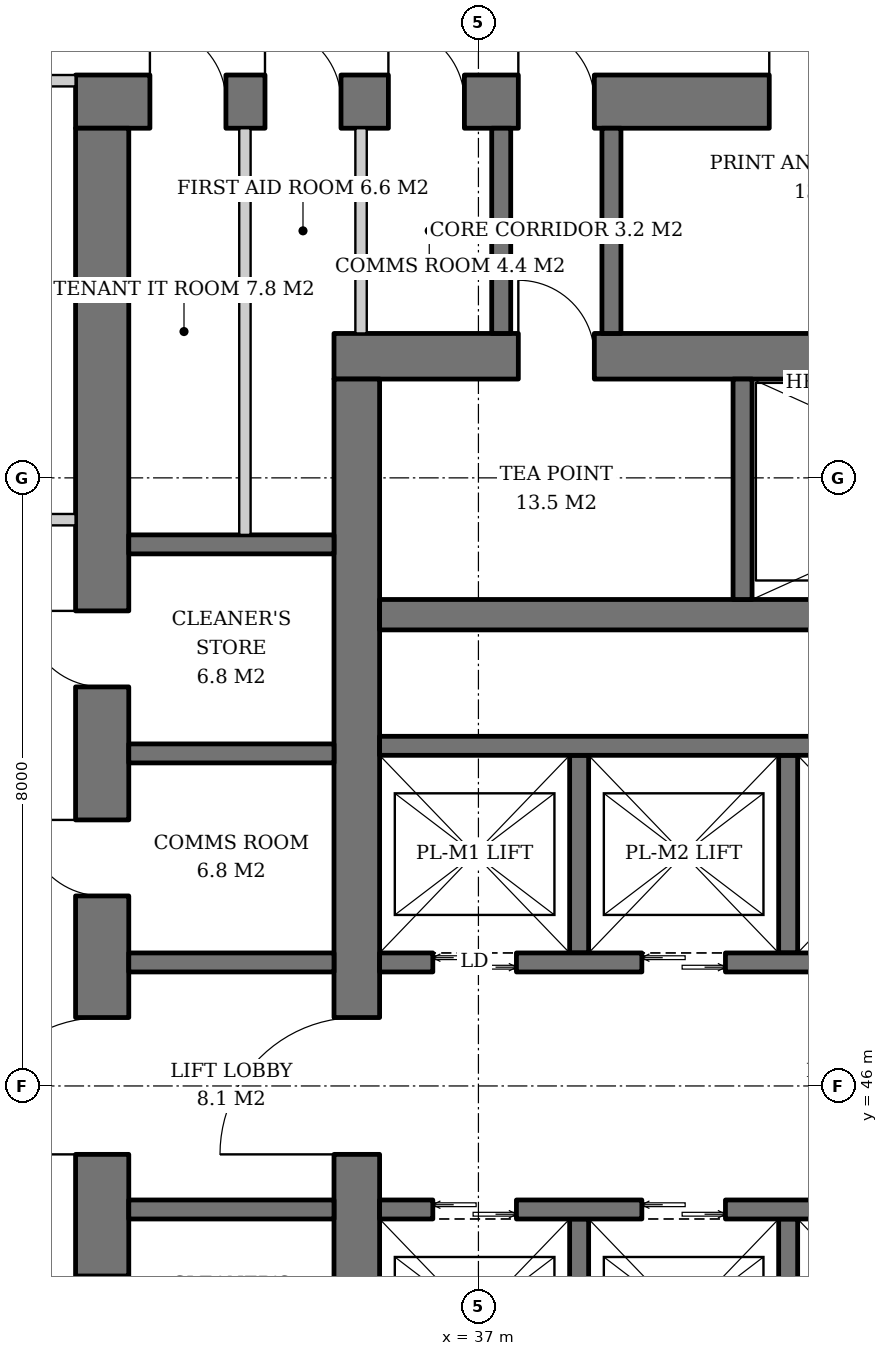
"""IFC4 building model, lengths in metres.
Left out: names, types, materials, properties, quantities, classifications, styles, units other than length and angle.
Written with IfcOpenShell. Run it as: python <this file> out.ifc"""

import sys

from ifc_helpers import new_model, si_unit, direction, frame, frame_2d, origin, place, context, subcontext, project, spatial, rectangle, extrude, element, fill, save


model = new_model("IFC4")
c1 = context("Model", 3, precision=1e-05, world=origin(), true_north=direction((0.0, 1.0)))
c2 = subcontext(c1, "Body", "Model", "MODEL_VIEW")
j1 = project(units=[si_unit("LENGTHUNIT", "METRE"), si_unit("PLANEANGLEUNIT", "RADIAN")], contexts=[c1])
p1 = place(None, origin())
s1 = spatial("IfcSite", under=j1, at=p1, CompositionType="ELEMENT")
p2 = place(p1, origin())
s2 = spatial("IfcBuilding", under=s1, at=p2, CompositionType="ELEMENT")
p3 = place(p2, frame((0.0, 0.0, 119.8)))
s3 = spatial("IfcBuildingStorey", under=s2, at=p3, CompositionType="ELEMENT", Elevation=119.8)
p4 = place(p3, frame((35.1, 55.6, 0.0), z_axis=(0.0, 0.0, 1.0), x_axis=(1.0, 0.0, 0.0)))
e1 = element("IfcWall", 1, at=p4, inside=s3, PredefinedType="SHEAR", context=c2, shape_type="SweptSolid", body=[
    extrude(rectangle(XDim=19.8, YDim=0.6, at=frame_2d((9.9, 0.0))), origin(), (0.0, 0.0, 1.0), 3.8),
])
p5 = place(p4, frame((14.54, 0.0, 0.0)))
e2 = element("IfcOpeningElement", 2, at=p5, cuts=e1, PredefinedType="OPENING", context=c2, shape_type="SweptSolid", body=[
    extrude(rectangle(XDim=1.0, YDim=2.1, at=frame_2d((0.5, 1.05))), frame((0.0, 0.31, 0.0), z_axis=(0.0, -1.0, 0.0), x_axis=(1.0, 0.0, 0.0)), (0.0, 0.0, 1.0), 0.62),
])
p6 = place(p4, frame((2.425, 0.0, 0.0)))
e3 = element("IfcOpeningElement", 3, at=p6, cuts=e1, PredefinedType="OPENING", context=c2, shape_type="SweptSolid", body=[
    extrude(rectangle(XDim=1.0, YDim=2.1, at=frame_2d((0.5, 1.05))), frame((0.0, 0.31, 0.0), z_axis=(0.0, -1.0, 0.0), x_axis=(1.0, 0.0, 0.0)), (0.0, 0.0, 1.0), 0.62),
])
p7 = place(p3, frame((35.4, 36.7, 0.0), z_axis=(0.0, 0.0, 1.0), x_axis=(0.0, 1.0, 0.0)))
e4 = element("IfcWall", 4, at=p7, inside=s3, PredefinedType="SHEAR", context=c2, shape_type="SweptSolid", body=[
    extrude(rectangle(XDim=18.6, YDim=0.6, at=frame_2d((9.3, 0.0))), origin(), (0.0, 0.0, 1.0), 3.8),
])
p8 = place(p7, frame((8.4, 0.0, 0.0)))
e5 = element("IfcOpeningElement", 5, at=p8, cuts=e4, PredefinedType="OPENING", context=c2, shape_type="SweptSolid", body=[
    extrude(rectangle(XDim=1.8, YDim=2.4, at=frame_2d((0.9, 1.2))), frame((0.0, 0.31, 0.0), z_axis=(0.0, -1.0, 0.0), x_axis=(1.0, 0.0, 0.0)), (0.0, 0.0, 1.0), 0.62),
])
p9 = place(p3, frame((31.7, 58.95, 0.0), z_axis=(0.0, 0.0, 1.0), x_axis=(1.0, 0.0, 0.0)))
e6 = element("IfcWall", 6, at=p9, inside=s3, PredefinedType="SHEAR", context=c2, shape_type="SweptSolid", body=[
    extrude(rectangle(XDim=26.6, YDim=0.7, at=frame_2d((13.3, 0.0))), origin(), (0.0, 0.0, 1.0), 3.8),
])
p10 = place(p9, frame((17.94, 0.0, 0.0)))
e7 = element("IfcOpeningElement", 7, at=p10, cuts=e6, PredefinedType="OPENING", context=c2, shape_type="SweptSolid", body=[
    extrude(rectangle(XDim=1.0, YDim=2.1, at=frame_2d((0.5, 1.05))), frame((0.0, 0.36, 0.0), z_axis=(0.0, -1.0, 0.0), x_axis=(1.0, 0.0, 0.0)), (0.0, 0.0, 1.0), 0.72),
])
p11 = place(p9, frame((5.825, 0.0, 0.0)))
e8 = element("IfcOpeningElement", 8, at=p11, cuts=e6, PredefinedType="OPENING", context=c2, shape_type="SweptSolid", body=[
    extrude(rectangle(XDim=1.0, YDim=2.1, at=frame_2d((0.5, 1.05))), frame((0.0, 0.36, 0.0), z_axis=(0.0, -1.0, 0.0), x_axis=(1.0, 0.0, 0.0)), (0.0, 0.0, 1.0), 0.72),
])
p12 = place(p9, frame((0.978, 0.0, 0.0)))
e9 = element("IfcOpeningElement", 9, at=p12, cuts=e6, PredefinedType="OPENING", context=c2, shape_type="SweptSolid", body=[
    extrude(rectangle(XDim=1.0, YDim=2.1, at=frame_2d((0.5, 1.05))), frame((0.0, 0.36, 0.0), z_axis=(0.0, -1.0, 0.0), x_axis=(1.0, 0.0, 0.0)), (0.0, 0.0, 1.0), 0.72),
])
p13 = place(p9, frame((2.492, 0.0, 0.0)))
e10 = element("IfcOpeningElement", 10, at=p13, cuts=e6, PredefinedType="OPENING", context=c2, shape_type="SweptSolid", body=[
    extrude(rectangle(XDim=1.0, YDim=2.1, at=frame_2d((0.5, 1.05))), frame((0.0, 0.36, 0.0), z_axis=(0.0, -1.0, 0.0), x_axis=(1.0, 0.0, 0.0)), (0.0, 0.0, 1.0), 0.72),
])
p14 = place(p9, frame((4.115, 0.0, 0.0)))
e11 = element("IfcOpeningElement", 11, at=p14, cuts=e6, PredefinedType="OPENING", context=c2, shape_type="SweptSolid", body=[
    extrude(rectangle(XDim=1.0, YDim=2.1, at=frame_2d((0.5, 1.05))), frame((0.0, 0.36, 0.0), z_axis=(0.0, -1.0, 0.0), x_axis=(1.0, 0.0, 0.0)), (0.0, 0.0, 1.0), 0.72),
])
p15 = place(p9, frame((9.126, 0.0, 0.0)))
e12 = element("IfcOpeningElement", 12, at=p15, cuts=e6, PredefinedType="OPENING", context=c2, shape_type="SweptSolid", body=[
    extrude(rectangle(XDim=1.0, YDim=2.1, at=frame_2d((0.5, 1.05))), frame((0.0, 0.36, 0.0), z_axis=(0.0, -1.0, 0.0), x_axis=(1.0, 0.0, 0.0)), (0.0, 0.0, 1.0), 0.72),
])
p16 = place(p9, frame((14.029, 0.0, 0.0)))
e13 = element("IfcOpeningElement", 13, at=p16, cuts=e6, PredefinedType="OPENING", context=c2, shape_type="SweptSolid", body=[
    extrude(rectangle(XDim=1.0, YDim=2.1, at=frame_2d((0.5, 1.05))), frame((0.0, 0.36, 0.0), z_axis=(0.0, -1.0, 0.0), x_axis=(1.0, 0.0, 0.0)), (0.0, 0.0, 1.0), 0.72),
])
p17 = place(p9, frame((22.4, 0.0, 0.0)))
e14 = element("IfcOpeningElement", 14, at=p17, cuts=e6, PredefinedType="OPENING", context=c2, shape_type="SweptSolid", body=[
    extrude(rectangle(XDim=1.0, YDim=2.1, at=frame_2d((0.5, 1.05))), frame((0.0, 0.36, 0.0), z_axis=(0.0, -1.0, 0.0), x_axis=(1.0, 0.0, 0.0)), (0.0, 0.0, 1.0), 0.72),
])
p18 = place(p3, frame((32.05, 33.4, 0.0), z_axis=(0.0, 0.0, 1.0), x_axis=(0.0, 1.0, 0.0)))
e15 = element("IfcWall", 15, at=p18, inside=s3, PredefinedType="SHEAR", context=c2, shape_type="SweptSolid", body=[
    extrude(rectangle(XDim=25.2, YDim=0.7, at=frame_2d((12.6, 0.0))), origin(), (0.0, 0.0, 1.0), 3.8),
])
p19 = place(p18, frame((11.7, 0.0, 0.0)))
e16 = element("IfcOpeningElement", 16, at=p19, cuts=e15, PredefinedType="OPENING", context=c2, shape_type="SweptSolid", body=[
    extrude(rectangle(XDim=1.8, YDim=2.4, at=frame_2d((0.9, 1.2))), frame((0.0, 0.36, 0.0), z_axis=(0.0, -1.0, 0.0), x_axis=(1.0, 0.0, 0.0)), (0.0, 0.0, 1.0), 0.72),
])
p20 = place(p18, frame((3.6, 0.0, 0.0)))
e17 = element("IfcOpeningElement", 17, at=p20, cuts=e15, PredefinedType="OPENING", context=c2, shape_type="SweptSolid", body=[
    extrude(rectangle(XDim=1.0, YDim=2.1, at=frame_2d((0.5, 1.05))), frame((0.0, 0.36, 0.0), z_axis=(0.0, -1.0, 0.0), x_axis=(1.0, 0.0, 0.0)), (0.0, 0.0, 1.0), 0.72),
])
p21 = place(p18, frame((6.35, 0.0, 0.0)))
e18 = element("IfcOpeningElement", 18, at=p21, cuts=e15, PredefinedType="OPENING", context=c2, shape_type="SweptSolid", body=[
    extrude(rectangle(XDim=1.0, YDim=2.1, at=frame_2d((0.5, 1.05))), frame((0.0, 0.36, 0.0), z_axis=(0.0, -1.0, 0.0), x_axis=(1.0, 0.0, 0.0)), (0.0, 0.0, 1.0), 0.72),
])
p22 = place(p18, frame((9.1, 0.0, 0.0)))
e19 = element("IfcOpeningElement", 19, at=p22, cuts=e15, PredefinedType="OPENING", context=c2, shape_type="SweptSolid", body=[
    extrude(rectangle(XDim=1.0, YDim=2.1, at=frame_2d((0.5, 1.05))), frame((0.0, 0.36, 0.0), z_axis=(0.0, -1.0, 0.0), x_axis=(1.0, 0.0, 0.0)), (0.0, 0.0, 1.0), 0.72),
])
p23 = place(p18, frame((15.1, 0.0, 0.0)))
e20 = element("IfcOpeningElement", 20, at=p23, cuts=e15, PredefinedType="OPENING", context=c2, shape_type="SweptSolid", body=[
    extrude(rectangle(XDim=1.0, YDim=2.1, at=frame_2d((0.5, 1.05))), frame((0.0, 0.36, 0.0), z_axis=(0.0, -1.0, 0.0), x_axis=(1.0, 0.0, 0.0)), (0.0, 0.0, 1.0), 0.72),
])
p24 = place(p18, frame((17.85, 0.0, 0.0)))
e21 = element("IfcOpeningElement", 21, at=p24, cuts=e15, PredefinedType="OPENING", context=c2, shape_type="SweptSolid", body=[
    extrude(rectangle(XDim=1.0, YDim=2.1, at=frame_2d((0.5, 1.05))), frame((0.0, 0.36, 0.0), z_axis=(0.0, -1.0, 0.0), x_axis=(1.0, 0.0, 0.0)), (0.0, 0.0, 1.0), 0.72),
])
p25 = place(p3, frame((35.7, 52.2, 0.0), z_axis=(0.0, 0.0, 1.0), x_axis=(1.0, 0.0, 0.0)))
e22 = element("IfcWall", 22, at=p25, inside=s3, PredefinedType="SHEAR", context=c2, shape_type="SweptSolid", body=[
    extrude(rectangle(XDim=18.6, YDim=0.4, at=frame_2d((9.3, 0.0))), origin(), (0.0, 0.0, 1.0), 3.8),
])
p26 = place(p3, frame((40.475, 52.4, 0.0), z_axis=(0.0, 0.0, 1.0), x_axis=(0.0, 1.0, 0.0)))
e23 = element("IfcWall", 23, at=p26, inside=s3, PredefinedType="SHEAR", context=c2, shape_type="SweptSolid", body=[
    extrude(rectangle(XDim=2.9, YDim=0.25, at=frame_2d((1.45, 0.0))), origin(), (0.0, 0.0, 1.0), 3.8),
])
for number, where, z_axis, x_axis in (
    (24, (38.325, 47.75, 0.0), (0.0, 0.0, 1.0), (0.0, 1.0, 0.0)),
    (25, (41.075, 47.75, 0.0), (0.0, 0.0, 1.0), (0.0, 1.0, 0.0)),
):
    element("IfcWall", number, at=place(p3, frame(where, z_axis=z_axis, x_axis=x_axis)), inside=s3, PredefinedType="SHEAR", context=c2, shape_type="SweptSolid", body=[
        extrude(rectangle(XDim=2.6, YDim=0.25, at=frame_2d((1.3, 0.0))), origin(), (0.0, 0.0, 1.0), 3.8),
    ])
p27 = place(p3, frame((35.7, 50.475, 0.0), z_axis=(0.0, 0.0, 1.0), x_axis=(1.0, 0.0, 0.0)))
e26 = element("IfcWall", 26, at=p27, inside=s3, PredefinedType="SHEAR", context=c2, shape_type="SweptSolid", body=[
    extrude(rectangle(XDim=11.0, YDim=0.25, at=frame_2d((5.5, 0.0))), origin(), (0.0, 0.0, 1.0), 3.8),
])
p28 = place(p3, frame((35.7, 47.625, 0.0), z_axis=(0.0, 0.0, 1.0), x_axis=(1.0, 0.0, 0.0)))
e27 = element("IfcWall", 27, at=p28, inside=s3, PredefinedType="SHEAR", context=c2, shape_type="SweptSolid", body=[
    extrude(rectangle(XDim=12.83, YDim=0.25, at=frame_2d((6.415, 0.0))), origin(), (0.0, 0.0, 1.0), 3.8),
])
p29 = place(p28, frame((0.7, 0.0, 0.0)))
e28 = element("IfcOpeningElement", 28, at=p29, cuts=e27, PredefinedType="OPENING", context=c2, shape_type="SweptSolid", body=[
    extrude(rectangle(XDim=1.1, YDim=2.2, at=frame_2d((0.55, 1.1))), frame((0.0, 0.135, 0.0), z_axis=(0.0, -1.0, 0.0), x_axis=(1.0, 0.0, 0.0)), (0.0, 0.0, 1.0), 0.27),
])
p30 = place(p28, frame((3.45, 0.0, 0.0)))
e29 = element("IfcOpeningElement", 29, at=p30, cuts=e27, PredefinedType="OPENING", context=c2, shape_type="SweptSolid", body=[
    extrude(rectangle(XDim=1.1, YDim=2.2, at=frame_2d((0.55, 1.1))), frame((0.0, 0.135, 0.0), z_axis=(0.0, -1.0, 0.0), x_axis=(1.0, 0.0, 0.0)), (0.0, 0.0, 1.0), 0.27),
])
p31 = place(p28, frame((6.2, 0.0, 0.0)))
e30 = element("IfcOpeningElement", 30, at=p31, cuts=e27, PredefinedType="OPENING", context=c2, shape_type="SweptSolid", body=[
    extrude(rectangle(XDim=1.1, YDim=2.2, at=frame_2d((0.55, 1.1))), frame((0.0, 0.135, 0.0), z_axis=(0.0, -1.0, 0.0), x_axis=(1.0, 0.0, 0.0)), (0.0, 0.0, 1.0), 0.27),
])
p32 = place(p28, frame((8.95, 0.0, 0.0)))
e31 = element("IfcOpeningElement", 31, at=p32, cuts=e27, PredefinedType="OPENING", context=c2, shape_type="SweptSolid", body=[
    extrude(rectangle(XDim=1.1, YDim=2.2, at=frame_2d((0.55, 1.1))), frame((0.0, 0.135, 0.0), z_axis=(0.0, -1.0, 0.0), x_axis=(1.0, 0.0, 0.0)), (0.0, 0.0, 1.0), 0.27),
])
p33 = place(p28, frame((11.515, 0.0, 0.0)))
e32 = element("IfcOpeningElement", 32, at=p33, cuts=e27, PredefinedType="OPENING", context=c2, shape_type="SweptSolid", body=[
    extrude(rectangle(XDim=0.8, YDim=2.0, at=frame_2d((0.4, 1.0))), frame((0.0, 0.135, 0.0), z_axis=(0.0, -1.0, 0.0), x_axis=(1.0, 0.0, 0.0)), (0.0, 0.0, 1.0), 0.27),
])
for number, where, z_axis, x_axis in (
    (33, (38.325, 44.25, 0.0), (0.0, 0.0, 1.0), (0.0, -1.0, 0.0)),
    (34, (41.075, 44.25, 0.0), (0.0, 0.0, 1.0), (0.0, -1.0, 0.0)),
):
    element("IfcWall", number, at=place(p3, frame(where, z_axis=z_axis, x_axis=x_axis)), inside=s3, PredefinedType="SHEAR", context=c2, shape_type="SweptSolid", body=[
        extrude(rectangle(XDim=2.6, YDim=0.25, at=frame_2d((1.3, 0.0))), origin(), (0.0, 0.0, 1.0), 3.8),
    ])
p34 = place(p3, frame((35.7, 44.375, 0.0), z_axis=(0.0, 0.0, 1.0), x_axis=(1.0, 0.0, 0.0)))
e35 = element("IfcWall", 35, at=p34, inside=s3, PredefinedType="SHEAR", context=c2, shape_type="SweptSolid", body=[
    extrude(rectangle(XDim=12.83, YDim=0.25, at=frame_2d((6.415, 0.0))), origin(), (0.0, 0.0, 1.0), 3.8),
])
p35 = place(p34, frame((0.7, 0.0, 0.0)))
e36 = element("IfcOpeningElement", 36, at=p35, cuts=e35, PredefinedType="OPENING", context=c2, shape_type="SweptSolid", body=[
    extrude(rectangle(XDim=1.1, YDim=2.2, at=frame_2d((0.55, 1.1))), frame((0.0, 0.135, 0.0), z_axis=(0.0, -1.0, 0.0), x_axis=(1.0, 0.0, 0.0)), (0.0, 0.0, 1.0), 0.27),
])
p36 = place(p34, frame((3.45, 0.0, 0.0)))
e37 = element("IfcOpeningElement", 37, at=p36, cuts=e35, PredefinedType="OPENING", context=c2, shape_type="SweptSolid", body=[
    extrude(rectangle(XDim=1.1, YDim=2.2, at=frame_2d((0.55, 1.1))), frame((0.0, 0.135, 0.0), z_axis=(0.0, -1.0, 0.0), x_axis=(1.0, 0.0, 0.0)), (0.0, 0.0, 1.0), 0.27),
])
p37 = place(p34, frame((6.2, 0.0, 0.0)))
e38 = element("IfcOpeningElement", 38, at=p37, cuts=e35, PredefinedType="OPENING", context=c2, shape_type="SweptSolid", body=[
    extrude(rectangle(XDim=1.1, YDim=2.2, at=frame_2d((0.55, 1.1))), frame((0.0, 0.135, 0.0), z_axis=(0.0, -1.0, 0.0), x_axis=(1.0, 0.0, 0.0)), (0.0, 0.0, 1.0), 0.27),
])
p38 = place(p34, frame((8.95, 0.0, 0.0)))
e39 = element("IfcOpeningElement", 39, at=p38, cuts=e35, PredefinedType="OPENING", context=c2, shape_type="SweptSolid", body=[
    extrude(rectangle(XDim=1.1, YDim=2.2, at=frame_2d((0.55, 1.1))), frame((0.0, 0.135, 0.0), z_axis=(0.0, -1.0, 0.0), x_axis=(1.0, 0.0, 0.0)), (0.0, 0.0, 1.0), 0.27),
])
p39 = place(p34, frame((11.515, 0.0, 0.0)))
e40 = element("IfcOpeningElement", 40, at=p39, cuts=e35, PredefinedType="OPENING", context=c2, shape_type="SweptSolid", body=[
    extrude(rectangle(XDim=0.8, YDim=2.0, at=frame_2d((0.4, 1.0))), frame((0.0, 0.135, 0.0), z_axis=(0.0, -1.0, 0.0), x_axis=(1.0, 0.0, 0.0)), (0.0, 0.0, 1.0), 0.27),
])
for number, where, z_axis, x_axis in (
    (41, (32.4, 44.375, 0.0), (0.0, 0.0, 1.0), (1.0, 0.0, 0.0)),
    (42, (32.4, 47.625, 0.0), (0.0, 0.0, 1.0), (1.0, 0.0, 0.0)),
    (43, (32.4, 50.375, 0.0), (0.0, 0.0, 1.0), (1.0, 0.0, 0.0)),
    (44, (32.4, 53.125, 0.0), (0.0, 0.0, 1.0), (1.0, 0.0, 0.0)),
):
    element("IfcWall", number, at=place(p3, frame(where, z_axis=z_axis, x_axis=x_axis)), inside=s3, PredefinedType="SHEAR", context=c2, shape_type="SweptSolid", body=[
        extrude(rectangle(XDim=2.7, YDim=0.25, at=frame_2d((1.35, 0.0))), origin(), (0.0, 0.0, 1.0), 3.8),
    ])
for number, where, z_axis, x_axis in (
    (45, (37.3, 55.9, 0.0), (0.0, 0.0, 1.0), (0.0, 1.0, 0.0)),
    (46, (38.75, 55.9, 0.0), (0.0, 0.0, 1.0), (0.0, 1.0, 0.0)),
):
    element("IfcWall", number, at=place(p3, frame(where, z_axis=z_axis, x_axis=x_axis)), inside=s3, PredefinedType="SOLIDWALL", context=c2, shape_type="SweptSolid", body=[
        extrude(rectangle(XDim=2.7, YDim=0.25, at=frame_2d((1.35, 0.0))), origin(), (0.0, 0.0, 1.0), 3.62),
    ])
p40 = place(p3, frame((33.928, 53.25, 0.0), z_axis=(0.0, 0.0, 1.0), x_axis=(0.0, 1.0, 0.0)))
e47 = element("IfcWall", 47, at=p40, inside=s3, PredefinedType="SOLIDWALL", context=c2, shape_type="SweptSolid", body=[
    extrude(rectangle(XDim=5.35, YDim=0.15, at=frame_2d((2.675, 0.0))), origin(), (0.0, 0.0, 1.0), 3.62),
])
p41 = place(p3, frame((35.456, 55.9, 0.0), z_axis=(0.0, 0.0, 1.0), x_axis=(0.0, 1.0, 0.0)))
e48 = element("IfcWall", 48, at=p41, inside=s3, PredefinedType="SOLIDWALL", context=c2, shape_type="SweptSolid", body=[
    extrude(rectangle(XDim=2.7, YDim=0.15, at=frame_2d((1.35, 0.0))), origin(), (0.0, 0.0, 1.0), 3.62),
])
for number, where, z_axis, x_axis in (
    (49, (31.7, 59.225, 0.0), (0.0, 0.0, 1.0), (-1.0, 0.0, 0.0)),
    (50, (31.7, 53.45, 0.0), (0.0, 0.0, 1.0), (-1.0, 0.0, 0.0)),
):
    element("IfcWall", number, at=place(p3, frame(where, z_axis=z_axis, x_axis=x_axis)), inside=s3, PredefinedType="PARTITIONING", context=c2, shape_type="SweptSolid", body=[
        extrude(rectangle(XDim=2.325, YDim=0.15, at=frame_2d((1.163, 0.0))), origin(), (0.0, 0.0, 1.0), 3.62),
    ])
p42 = place(p29, origin())
e51 = element("IfcDoor", 51, at=p42, inside=s3, OperationType="DOUBLE_DOOR_SLIDING", PredefinedType="DOOR", context=c2, shape_type="SweptSolid", body=[
    extrude(rectangle(XDim=1.1, YDim=2.2, at=frame_2d((0.55, 1.1))), frame((0.0, 0.025, 0.0), z_axis=(0.0, -1.0, 0.0), x_axis=(1.0, 0.0, 0.0)), (0.0, 0.0, 1.0), 0.05),
])
fill(e28, e51)
p43 = place(p30, origin())
e52 = element("IfcDoor", 52, at=p43, inside=s3, OperationType="DOUBLE_DOOR_SLIDING", PredefinedType="DOOR", context=c2, shape_type="SweptSolid", body=[
    extrude(rectangle(XDim=1.1, YDim=2.2, at=frame_2d((0.55, 1.1))), frame((0.0, 0.025, 0.0), z_axis=(0.0, -1.0, 0.0), x_axis=(1.0, 0.0, 0.0)), (0.0, 0.0, 1.0), 0.05),
])
fill(e29, e52)
p44 = place(p35, origin())
e53 = element("IfcDoor", 53, at=p44, inside=s3, OperationType="DOUBLE_DOOR_SLIDING", PredefinedType="DOOR", context=c2, shape_type="SweptSolid", body=[
    extrude(rectangle(XDim=1.1, YDim=2.2, at=frame_2d((0.55, 1.1))), frame((0.0, 0.025, 0.0), z_axis=(0.0, -1.0, 0.0), x_axis=(1.0, 0.0, 0.0)), (0.0, 0.0, 1.0), 0.05),
])
fill(e36, e53)
p45 = place(p36, origin())
e54 = element("IfcDoor", 54, at=p45, inside=s3, OperationType="DOUBLE_DOOR_SLIDING", PredefinedType="DOOR", context=c2, shape_type="SweptSolid", body=[
    extrude(rectangle(XDim=1.1, YDim=2.2, at=frame_2d((0.55, 1.1))), frame((0.0, 0.025, 0.0), z_axis=(0.0, -1.0, 0.0), x_axis=(1.0, 0.0, 0.0)), (0.0, 0.0, 1.0), 0.05),
])
fill(e37, e54)
p46 = place(p8, origin())
e55 = element("IfcDoor", 55, at=p46, inside=s3, OperationType="DOUBLE_DOOR_SINGLE_SWING", PredefinedType="DOOR", context=c2, shape_type="SweptSolid", body=[
    extrude(rectangle(XDim=1.8, YDim=2.4, at=frame_2d((0.9, 1.2))), frame((0.0, 0.025, 0.0), z_axis=(0.0, -1.0, 0.0), x_axis=(1.0, 0.0, 0.0)), (0.0, 0.0, 1.0), 0.05),
])
fill(e5, e55)
p47 = place(p19, origin())
e56 = element("IfcDoor", 56, at=p47, inside=s3, OperationType="DOUBLE_DOOR_SINGLE_SWING", PredefinedType="DOOR", context=c2, shape_type="SweptSolid", body=[
    extrude(rectangle(XDim=1.8, YDim=2.4, at=frame_2d((0.9, 1.2))), frame((0.0, 0.025, 0.0), z_axis=(0.0, -1.0, 0.0), x_axis=(1.0, 0.0, 0.0)), (0.0, 0.0, 1.0), 0.05),
])
fill(e16, e56)
p48 = place(p11, origin())
e57 = element("IfcDoor", 57, at=p48, inside=s3, OperationType="SINGLE_SWING_LEFT", PredefinedType="DOOR", context=c2, shape_type="SweptSolid", body=[
    extrude(rectangle(XDim=1.0, YDim=2.1, at=frame_2d((0.5, 1.05))), frame((0.0, 0.025, 0.0), z_axis=(0.0, -1.0, 0.0), x_axis=(1.0, 0.0, 0.0)), (0.0, 0.0, 1.0), 0.05),
])
fill(e8, e57)
p49 = place(p6, origin())
e58 = element("IfcDoor", 58, at=p49, inside=s3, OperationType="SINGLE_SWING_LEFT", PredefinedType="DOOR", context=c2, shape_type="SweptSolid", body=[
    extrude(rectangle(XDim=1.0, YDim=2.1, at=frame_2d((0.5, 1.05))), frame((0.0, -0.24, 0.0), z_axis=(0.0, -1.0, 0.0), x_axis=(1.0, 0.0, 0.0)), (0.0, 0.0, 1.0), 0.05),
])
fill(e3, e58)
p50 = place(p23, origin())
e59 = element("IfcDoor", 59, at=p50, inside=s3, OperationType="SINGLE_SWING_RIGHT", PredefinedType="DOOR", context=c2, shape_type="SweptSolid", body=[
    extrude(rectangle(XDim=1.0, YDim=2.1, at=frame_2d((0.5, 1.05))), frame((0.0, -0.29, 0.0), z_axis=(0.0, -1.0, 0.0), x_axis=(1.0, 0.0, 0.0)), (0.0, 0.0, 1.0), 0.05),
])
fill(e20, e59)
p51 = place(p24, origin())
e60 = element("IfcDoor", 60, at=p51, inside=s3, OperationType="SINGLE_SWING_RIGHT", PredefinedType="DOOR", context=c2, shape_type="SweptSolid", body=[
    extrude(rectangle(XDim=1.0, YDim=2.1, at=frame_2d((0.5, 1.05))), frame((0.0, -0.29, 0.0), z_axis=(0.0, -1.0, 0.0), x_axis=(1.0, 0.0, 0.0)), (0.0, 0.0, 1.0), 0.05),
])
fill(e21, e60)
p52 = place(p12, origin())
e61 = element("IfcDoor", 61, at=p52, inside=s3, OperationType="SINGLE_SWING_LEFT", PredefinedType="DOOR", context=c2, shape_type="SweptSolid", body=[
    extrude(rectangle(XDim=1.0, YDim=2.1, at=frame_2d((0.5, 1.05))), frame((0.0, -0.29, 0.0), z_axis=(0.0, -1.0, 0.0), x_axis=(1.0, 0.0, 0.0)), (0.0, 0.0, 1.0), 0.05),
])
fill(e9, e61)
p53 = place(p13, origin())
e62 = element("IfcDoor", 62, at=p53, inside=s3, OperationType="SINGLE_SWING_LEFT", PredefinedType="DOOR", context=c2, shape_type="SweptSolid", body=[
    extrude(rectangle(XDim=1.0, YDim=2.1, at=frame_2d((0.5, 1.05))), frame((0.0, -0.29, 0.0), z_axis=(0.0, -1.0, 0.0), x_axis=(1.0, 0.0, 0.0)), (0.0, 0.0, 1.0), 0.05),
])
fill(e10, e62)
p54 = place(p14, origin())
e63 = element("IfcDoor", 63, at=p54, inside=s3, OperationType="SINGLE_SWING_LEFT", PredefinedType="DOOR", context=c2, shape_type="SweptSolid", body=[
    extrude(rectangle(XDim=1.0, YDim=2.1, at=frame_2d((0.5, 1.05))), frame((0.0, -0.29, 0.0), z_axis=(0.0, -1.0, 0.0), x_axis=(1.0, 0.0, 0.0)), (0.0, 0.0, 1.0), 0.05),
])
fill(e11, e63)
p55 = place(p15, origin())
e64 = element("IfcDoor", 64, at=p55, inside=s3, OperationType="SINGLE_SWING_LEFT", PredefinedType="DOOR", context=c2, shape_type="SweptSolid", body=[
    extrude(rectangle(XDim=1.0, YDim=2.1, at=frame_2d((0.5, 1.05))), frame((0.0, -0.29, 0.0), z_axis=(0.0, -1.0, 0.0), x_axis=(1.0, 0.0, 0.0)), (0.0, 0.0, 1.0), 0.05),
])
fill(e12, e64)
save(model, sys.argv[1])
